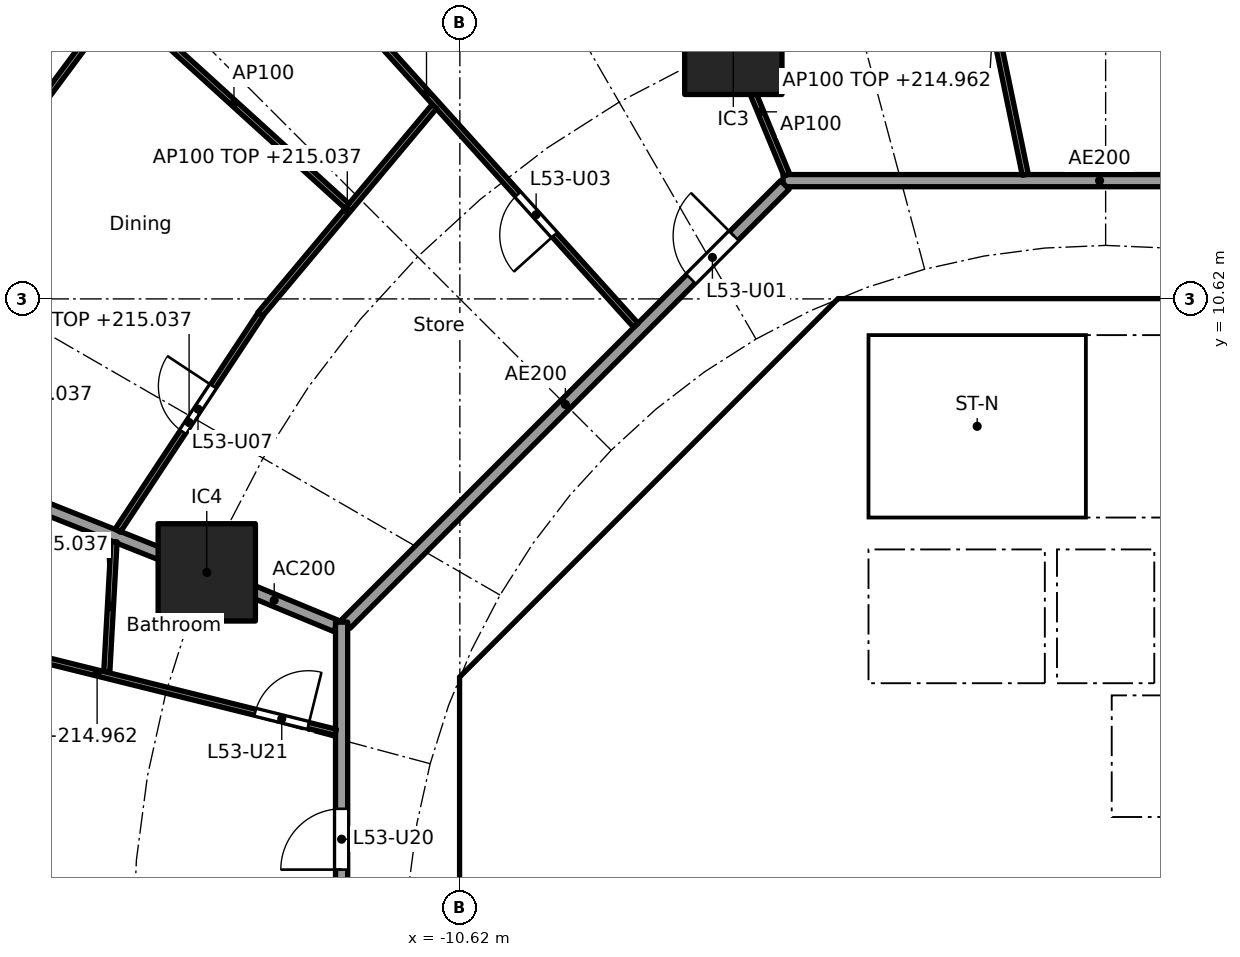
"""IFC4 building model, lengths in metres.
Left out: names, types, materials, properties, quantities, classifications, styles, units other than length and angle.
Written with IfcOpenShell. Run it as: python <this file> out.ifc"""

import sys

from ifc_helpers import new_model, si_unit, direction, frame, frame_2d, origin, origin_2d, place, context, subcontext, project, spatial, polyline, rectangle, outline, extrude, element, fill, save


model = new_model("IFC4")
c1 = context("Model", 3, precision=1e-05, world=origin(), true_north=direction((0.0, 1.0)))
c2 = subcontext(c1, "Body", "Model", "MODEL_VIEW")
j1 = project(units=[si_unit("LENGTHUNIT", "METRE"), si_unit("PLANEANGLEUNIT", "RADIAN")], contexts=[c1])
p1 = place(None, origin())
s1 = spatial("IfcSite", under=j1, at=p1, CompositionType="ELEMENT")
p2 = place(p1, origin())
s2 = spatial("IfcBuilding", under=s1, at=p2, CompositionType="ELEMENT")
p3 = place(p2, frame((0.0, 0.0, 212.2)))
s3 = spatial("IfcBuildingStorey", under=s2, at=p3, CompositionType="ELEMENT", Elevation=212.2)
for number, where, z_axis, x_axis in (
    (1, (-6.123, 14.782, 0.0), (0.0, 0.0, 1.0), (1.0, 0.0, 0.0)),
    (2, (-14.782, 6.123, 0.0), (0.0, 0.0, 1.0), (1.0, 0.0, 0.0)),
):
    element("IfcColumn", number, at=place(p3, frame(where, z_axis=z_axis, x_axis=x_axis)), inside=s3, PredefinedType="COLUMN", context=c2, shape_type="SweptSolid", body=[
        extrude(rectangle(XDim=1.6, YDim=1.6, at=origin_2d()), origin(), (0.0, 0.0, 1.0), 3.7),
    ])
p4 = place(p3, frame((-4.613, 9.988, 0.0), z_axis=(0.0, 0.0, 1.0), x_axis=(-0.707106781187, -0.707106781187, 0.0)))
e3 = element("IfcWall", 3, at=p4, inside=s3, PredefinedType="SHEAR", context=c2, shape_type="SweptSolid", body=[
    extrude(rectangle(XDim=7.602, YDim=0.6, at=frame_2d((3.801, 0.0))), origin(), (0.0, 0.0, 1.0), 3.44),
])
p5 = place(p4, frame((0.351, 0.0, 0.0)))
e4 = element("IfcOpeningElement", 4, at=p5, cuts=e3, PredefinedType="OPENING", context=c2, shape_type="SweptSolid", body=[
    extrude(rectangle(XDim=1.1, YDim=2.1, at=frame_2d((0.55, 1.05))), frame((0.0, 0.31, 0.0), z_axis=(0.0, -1.0, 0.0), x_axis=(1.0, 0.0, 0.0)), (0.0, 0.0, 1.0), 0.62),
])
p6 = place(p3, frame((-10.325, 3.801, 0.0), z_axis=(0.0, 0.0, 1.0), x_axis=(0.0, -1.0, 0.0)))
e5 = element("IfcWall", 5, at=p6, inside=s3, PredefinedType="SHEAR", context=c2, shape_type="SweptSolid", body=[
    extrude(rectangle(XDim=7.602, YDim=0.6, at=frame_2d((3.801, 0.0))), origin(), (0.0, 0.0, 1.0), 3.44),
])
p7 = place(p6, frame((0.651, 0.0, 0.0)))
e6 = element("IfcOpeningElement", 6, at=p7, cuts=e5, PredefinedType="OPENING", context=c2, shape_type="SweptSolid", body=[
    extrude(rectangle(XDim=1.5, YDim=2.1, at=frame_2d((0.75, 1.05))), frame((0.0, 0.31, 0.0), z_axis=(0.0, -1.0, 0.0), x_axis=(1.0, 0.0, 0.0)), (0.0, 0.0, 1.0), 0.62),
])
p8 = place(p6, frame((5.451, 0.0, 0.0)))
e7 = element("IfcOpeningElement", 7, at=p8, cuts=e5, PredefinedType="OPENING", context=c2, shape_type="SweptSolid", body=[
    extrude(rectangle(XDim=1.5, YDim=2.1, at=frame_2d((0.75, 1.05))), frame((0.0, 0.31, 0.0), z_axis=(0.0, -1.0, 0.0), x_axis=(1.0, 0.0, 0.0)), (0.0, 0.0, 1.0), 0.62),
])
p9 = place(p3, frame((-5.8, 4.3, 0.0), z_axis=(0.0, 0.0, 1.0), x_axis=(0.0, 1.0, 0.0)))
e8 = element("IfcWall", 8, at=p9, inside=s3, PredefinedType="PARTITIONING", context=c2, shape_type="SweptSolid", body=[
    extrude(rectangle(XDim=3.927, YDim=0.15, at=frame_2d((1.963, 0.0))), origin(), (0.0, 0.0, 1.0), 3.44),
])
p10 = place(p9, frame((1.551, 0.0, 0.0)))
e9 = element("IfcOpeningElement", 9, at=p10, cuts=e8, PredefinedType="OPENING", context=c2, shape_type="SweptSolid", body=[
    extrude(rectangle(XDim=0.9, YDim=2.1, at=frame_2d((0.45, 1.05))), frame((0.0, 0.085, 0.0), z_axis=(0.0, -1.0, 0.0), x_axis=(1.0, 0.0, 0.0)), (0.0, 0.0, 1.0), 0.17),
])
p11 = place(p3, frame((-4.0, 4.3, 0.0), z_axis=(0.0, 0.0, 1.0), x_axis=(0.0, 1.0, 0.0)))
e10 = element("IfcWall", 10, at=p11, inside=s3, PredefinedType="SOLIDWALL", context=c2, shape_type="SweptSolid", body=[
    extrude(rectangle(XDim=2.2, YDim=0.2, at=frame_2d((1.1, 0.0))), origin(), (0.0, 0.0, 1.0), 3.44),
])
p12 = place(p11, frame((0.55, 0.0, 0.0)))
e11 = element("IfcOpeningElement", 11, at=p12, cuts=e10, PredefinedType="OPENING", context=c2, shape_type="SweptSolid", body=[
    extrude(rectangle(XDim=1.1, YDim=2.1, at=frame_2d((0.55, 1.05))), frame((0.0, 0.11, 0.0), z_axis=(0.0, -1.0, 0.0), x_axis=(1.0, 0.0, 0.0)), (0.0, 0.0, 1.0), 0.22),
])
p13 = place(p3, frame((-6.7, 2.0, 0.0), z_axis=(0.0, 0.0, 1.0), x_axis=(1.0, 0.0, 0.0)))
e12 = element("IfcWall", 12, at=p13, inside=s3, PredefinedType="SOLIDWALL", context=c2, shape_type="SweptSolid", body=[
    extrude(rectangle(XDim=13.4, YDim=0.2, at=frame_2d((6.7, 0.0))), origin(), (0.0, 0.0, 1.0), 3.44),
])
p14 = place(p13, frame((7.25, 0.0, 0.0)))
e13 = element("IfcOpeningElement", 13, at=p14, cuts=e12, PredefinedType="OPENING", context=c2, shape_type="SweptSolid", body=[
    extrude(rectangle(XDim=1.1, YDim=2.1, at=frame_2d((0.55, 1.05))), frame((0.0, 0.11, 0.0), z_axis=(0.0, -1.0, 0.0), x_axis=(1.0, 0.0, 0.0)), (0.0, 0.0, 1.0), 0.22),
])
p15 = place(p13, frame((9.45, 0.0, 0.0)))
e14 = element("IfcOpeningElement", 14, at=p15, cuts=e12, PredefinedType="OPENING", context=c2, shape_type="SweptSolid", body=[
    extrude(rectangle(XDim=1.1, YDim=2.1, at=frame_2d((0.55, 1.05))), frame((0.0, 0.11, 0.0), z_axis=(0.0, -1.0, 0.0), x_axis=(1.0, 0.0, 0.0)), (0.0, 0.0, 1.0), 0.22),
])
p16 = place(p13, frame((0.75, 0.0, 0.0)))
e15 = element("IfcOpeningElement", 15, at=p16, cuts=e12, PredefinedType="OPENING", context=c2, shape_type="SweptSolid", body=[
    extrude(rectangle(XDim=0.9, YDim=2.1, at=frame_2d((0.45, 1.05))), frame((0.0, 0.11, 0.0), z_axis=(0.0, -1.0, 0.0), x_axis=(1.0, 0.0, 0.0)), (0.0, 0.0, 1.0), 0.22),
])
p17 = place(p13, frame((4.05, 0.0, 0.0)))
e16 = element("IfcOpeningElement", 16, at=p17, cuts=e12, PredefinedType="OPENING", context=c2, shape_type="SweptSolid", body=[
    extrude(rectangle(XDim=0.9, YDim=2.1, at=frame_2d((0.45, 1.05))), frame((0.0, 0.11, 0.0), z_axis=(0.0, -1.0, 0.0), x_axis=(1.0, 0.0, 0.0)), (0.0, 0.0, 1.0), 0.22),
])
p18 = place(p3, origin())
e17 = element("IfcWall", 17, at=p18, inside=s3, PredefinedType="SHEAR", context=c2, shape_type="SweptSolid", body=[
    extrude(outline(polyline([(-10.2, 4.825), (-9.776, 4.401), (-10.025, 4.152), (-10.025, 3.801), (-10.625, 3.801), (-10.625, 4.401), (-10.2, 4.825)])), origin(), (0.0, 0.0, 1.0), 3.44),
])
p19 = place(p3, origin())
e18 = element("IfcWall", 18, at=p19, inside=s3, PredefinedType="SHEAR", context=c2, shape_type="SweptSolid", body=[
    extrude(outline(polyline([(-4.152, 10.025), (-4.401, 9.776), (-4.825, 10.2), (-4.401, 10.625), (4.401, 10.625), (4.825, 10.2), (4.401, 9.776), (4.152, 10.025), (-4.152, 10.025)])), origin(), (0.0, 0.0, 1.0), 3.44),
])
for number, where, z_axis, x_axis in (
    (19, (-0.9, 4.3, 0.0), (0.0, 0.0, 1.0), (0.0, 1.0, 0.0)),
    (20, (0.9, 4.3, 0.0), (0.0, 0.0, 1.0), (0.0, 1.0, 0.0)),
):
    element("IfcWall", number, at=place(p3, frame(where, z_axis=z_axis, x_axis=x_axis)), inside=s3, PredefinedType="SOLIDWALL", context=c2, shape_type="SweptSolid", body=[
        extrude(rectangle(XDim=2.2, YDim=0.2, at=frame_2d((1.1, 0.0))), origin(), (0.0, 0.0, 1.0), 3.44),
    ])
p20 = place(p3, origin())
e21 = element("IfcWall", 21, at=p20, inside=s3, PredefinedType="SOLIDWALL", context=c2, shape_type="SweptSolid", body=[
    extrude(outline(polyline([(-6.7, 4.3), (6.7, 4.3), (6.7, 2.1), (6.5, 2.1), (6.5, 4.1), (4.5, 4.1), (4.5, 2.1), (4.3, 2.1), (4.3, 4.1), (2.3, 4.1), (2.3, 2.1), (2.1, 2.1), (2.1, 4.1), (0.1, 4.1), (0.1, 2.1), (-0.1, 2.1), (-0.1, 4.1), (-4.3, 4.1), (-4.3, 2.1), (-4.5, 2.1), (-4.5, 4.1), (-6.5, 4.1), (-6.5, 2.1), (-6.7, 2.1), (-6.7, 4.3)])), origin(), (0.0, 0.0, 1.0), 3.44),
])
p21 = place(p3, frame((-10.025, 4.0, 0.0), z_axis=(0.0, 0.0, 1.0), x_axis=(1.0, 0.0, 0.0)))
e22 = element("IfcWall", 22, at=p21, inside=s3, PredefinedType="PARTITIONING", context=c2, shape_type="SweptSolid", body=[
    extrude(rectangle(XDim=3.325, YDim=0.2, at=frame_2d((1.662, 0.0))), origin(), (0.0, 0.0, 1.0), 3.44),
])
p22 = place(p3, origin())
e23 = element("IfcWall", 23, at=p22, inside=s3, PredefinedType="SOLIDWALL", context=c2, shape_type="SweptSolid", body=[
    extrude(outline(polyline([(-3.9, 7.025), (-4.1, 7.025), (-4.1, 10.025), (-3.9, 10.025), (-3.9, 7.025)])), origin(), (0.0, 0.0, 1.0), 3.44),
])
p23 = place(p3, origin())
e24 = element("IfcWall", 24, at=p23, inside=s3, PredefinedType="SOLIDWALL", context=c2, shape_type="SweptSolid", body=[
    extrude(outline(polyline([(4.1, 6.5), (-4.1, 6.5), (-4.1, 7.025), (4.1, 7.025), (4.1, 6.5)])), origin(), (0.0, 0.0, 1.0), 3.44),
])
p24 = place(p3, frame((-12.657, 5.243, 0.0), z_axis=(0.0, 0.0, 1.0), x_axis=(-0.923859888513, 0.38273085373, 0.0)))
e25 = element("IfcWall", 25, at=p24, inside=s3, PredefinedType="PARTITIONING", context=c2, shape_type="SweptSolid", body=[
    extrude(rectangle(XDim=2.199, YDim=0.2, at=frame_2d((1.1, 0.0))), origin(), (0.0, 0.0, 1.0), 3.44),
])
p25 = place(p3, frame((-14.829, 6.141, 0.0), z_axis=(0.0, 0.0, 1.0), x_axis=(-0.929202069098, 0.36957206981, 0.0)))
e26 = element("IfcWall", 26, at=p25, inside=s3, PredefinedType="PARTITIONING", context=c2, shape_type="SweptSolid", body=[
    extrude(rectangle(XDim=9.957, YDim=0.2, at=frame_2d((4.978, 0.0))), origin(), (0.0, 0.0, 1.0), 2.837),
])
p26 = place(p3, frame((5.104, 12.565, 0.0), z_axis=(0.0, 0.0, 1.0), x_axis=(-1.0, 0.0, 0.0)))
e27 = element("IfcWall", 27, at=p26, inside=s3, PredefinedType="PARTITIONING", context=c2, shape_type="SweptSolid", body=[
    extrude(rectangle(XDim=10.409, YDim=0.2, at=frame_2d((5.205, 0.0))), origin(), (0.0, 0.0, 1.0), 3.44),
])
p27 = place(p3, frame((-5.275, 12.494, 0.0), z_axis=(0.0, 0.0, 1.0), x_axis=(-0.707106781187, -0.707106781187, 0.0)))
e28 = element("IfcWall", 28, at=p27, inside=s3, PredefinedType="PARTITIONING", context=c2, shape_type="SweptSolid", body=[
    extrude(rectangle(XDim=10.209, YDim=0.2, at=frame_2d((5.104, 0.0))), origin(), (0.0, 0.0, 1.0), 3.44),
])
p28 = place(p27, frame((1.185, 0.0, 0.0)))
e29 = element("IfcOpeningElement", 29, at=p28, cuts=e28, PredefinedType="OPENING", context=c2, shape_type="SweptSolid", body=[
    extrude(rectangle(XDim=1.0, YDim=2.1, at=frame_2d((0.5, 1.05))), frame((0.0, 0.11, 0.0), z_axis=(0.0, -1.0, 0.0), x_axis=(1.0, 0.0, 0.0)), (0.0, 0.0, 1.0), 0.22),
])
p29 = place(p3, frame((-12.565, 5.304, 0.0), z_axis=(0.0, 0.0, 1.0), x_axis=(0.0, -1.0, 0.0)))
e30 = element("IfcWall", 30, at=p29, inside=s3, PredefinedType="PARTITIONING", context=c2, shape_type="SweptSolid", body=[
    extrude(rectangle(XDim=10.409, YDim=0.2, at=frame_2d((5.205, 0.0))), origin(), (0.0, 0.0, 1.0), 3.44),
])
p30 = place(p29, frame((3.07, 0.0, 0.0)))
e31 = element("IfcOpeningElement", 31, at=p30, cuts=e30, PredefinedType="OPENING", context=c2, shape_type="SweptSolid", body=[
    extrude(rectangle(XDim=1.0, YDim=2.1, at=frame_2d((0.5, 1.05))), frame((0.0, 0.11, 0.0), z_axis=(0.0, -1.0, 0.0), x_axis=(1.0, 0.0, 0.0)), (0.0, 0.0, 1.0), 0.22),
])
p31 = place(p3, frame((-1.321, 12.663, 0.0), z_axis=(0.0, 0.0, 1.0), x_axis=(-0.202526486639, 0.979276785291, 0.0)))
e32 = element("IfcWall", 32, at=p31, inside=s3, PredefinedType="PARTITIONING", context=c2, shape_type="SweptSolid", body=[
    extrude(rectangle(XDim=5.204, YDim=0.1, at=frame_2d((2.602, 0.0))), origin(), (0.0, 0.0, 1.0), 2.762),
])
p32 = place(p31, frame((2.152, 0.0, 0.0)))
e33 = element("IfcOpeningElement", 33, at=p32, cuts=e32, PredefinedType="OPENING", context=c2, shape_type="SweptSolid", body=[
    extrude(rectangle(XDim=0.9, YDim=2.1, at=frame_2d((0.45, 1.05))), frame((0.0, 0.06, 0.0), z_axis=(0.0, -1.0, 0.0), x_axis=(1.0, 0.0, 0.0)), (0.0, 0.0, 1.0), 0.12),
])
p33 = place(p3, frame((-5.243, 12.657, 0.0), z_axis=(0.0, 0.0, 1.0), x_axis=(-0.382757529444, 0.923848837015, 0.0)))
e34 = element("IfcWall", 34, at=p33, inside=s3, PredefinedType="PARTITIONING", context=c2, shape_type="SweptSolid", body=[
    extrude(rectangle(XDim=2.25, YDim=0.1, at=frame_2d((1.125, 0.0))), origin(), (0.0, 0.0, 1.0), 3.44),
])
p34 = place(p3, frame((-7.725, 10.186, 0.0), z_axis=(0.0, 0.0, 1.0), x_axis=(-0.669819599194, 0.742523874725, 0.0)))
e35 = element("IfcWall", 35, at=p34, inside=s3, PredefinedType="PARTITIONING", context=c2, shape_type="SweptSolid", body=[
    extrude(rectangle(XDim=10.282, YDim=0.1, at=frame_2d((5.141, 0.0))), origin(), (0.0, 0.0, 1.0), 2.762),
])
p35 = place(p34, frame((2.0, 0.0, 0.0)))
e36 = element("IfcOpeningElement", 36, at=p35, cuts=e35, PredefinedType="OPENING", context=c2, shape_type="SweptSolid", body=[
    extrude(rectangle(XDim=0.9, YDim=2.1, at=frame_2d((0.45, 1.05))), frame((0.0, 0.06, 0.0), z_axis=(0.0, -1.0, 0.0), x_axis=(1.0, 0.0, 0.0)), (0.0, 0.0, 1.0), 0.12),
])
p36 = place(p34, frame((7.116, 0.0, 0.0)))
e37 = element("IfcOpeningElement", 37, at=p36, cuts=e35, PredefinedType="OPENING", context=c2, shape_type="SweptSolid", body=[
    extrude(rectangle(XDim=0.9, YDim=2.1, at=frame_2d((0.45, 1.05))), frame((0.0, 0.06, 0.0), z_axis=(0.0, -1.0, 0.0), x_axis=(1.0, 0.0, 0.0)), (0.0, 0.0, 1.0), 0.12),
])
p37 = place(p3, frame((-11.039, 13.785, 0.0), z_axis=(0.0, 0.0, 1.0), x_axis=(-0.642254625966, -0.766491353784, 0.0)))
e38 = element("IfcWall", 38, at=p37, inside=s3, PredefinedType="PARTITIONING", context=c2, shape_type="SweptSolid", body=[
    extrude(rectangle(XDim=4.461, YDim=0.1, at=frame_2d((2.23, 0.0))), origin(), (0.0, 0.0, 1.0), 2.837),
])
p38 = place(p3, frame((-14.608, 17.743, 0.0), z_axis=(0.0, 0.0, 1.0), x_axis=(-0.596174489482, -0.8028548923, 0.0)))
e39 = element("IfcWall", 39, at=p38, inside=s3, PredefinedType="PARTITIONING", context=c2, shape_type="SweptSolid", body=[
    extrude(rectangle(XDim=5.442, YDim=0.1, at=frame_2d((2.721, 0.0))), origin(), (0.0, 0.0, 1.0), 2.837),
])
p39 = place(p3, frame((-12.476, 12.147, 0.0), z_axis=(0.0, 0.0, 1.0), x_axis=(-0.740129203525, 0.672464692077, 0.0)))
e40 = element("IfcWall", 40, at=p39, inside=s3, PredefinedType="PARTITIONING", context=c2, shape_type="SweptSolid", body=[
    extrude(rectangle(XDim=5.022, YDim=0.1, at=frame_2d((2.511, 0.0))), origin(), (0.0, 0.0, 1.0), 3.44),
])
p40 = place(p3, frame((-13.899, 10.363, 0.0), z_axis=(0.0, 0.0, 1.0), x_axis=(-0.551267958114, -0.834328255758, 0.0)))
e41 = element("IfcWall", 41, at=p40, inside=s3, PredefinedType="PARTITIONING", context=c2, shape_type="SweptSolid", body=[
    extrude(rectangle(XDim=4.257, YDim=0.1, at=frame_2d((2.129, 0.0))), origin(), (0.0, 0.0, 1.0), 2.837),
])
p41 = place(p40, frame((1.413, 0.0, 0.0)))
e42 = element("IfcOpeningElement", 42, at=p41, cuts=e41, PredefinedType="OPENING", context=c2, shape_type="SweptSolid", body=[
    extrude(rectangle(XDim=0.9, YDim=2.1, at=frame_2d((0.45, 1.05))), frame((0.0, 0.06, 0.0), z_axis=(0.0, -1.0, 0.0), x_axis=(1.0, 0.0, 0.0)), (0.0, 0.0, 1.0), 0.12),
])
p42 = place(p3, frame((-16.307, 6.627, 0.0), z_axis=(0.0, 0.0, 1.0), x_axis=(-0.055608865939, -0.998452629837, 0.0)))
e43 = element("IfcWall", 43, at=p42, inside=s3, PredefinedType="PARTITIONING", context=c2, shape_type="SweptSolid", body=[
    extrude(rectangle(XDim=2.143, YDim=0.1, at=frame_2d((1.071, 0.0))), origin(), (0.0, 0.0, 1.0), 2.837),
])
p43 = place(p3, frame((-12.662, 3.494, 0.0), z_axis=(0.0, 0.0, 1.0), x_axis=(-0.970505526029, 0.241078874951, 0.0)))
e44 = element("IfcWall", 44, at=p43, inside=s3, PredefinedType="PARTITIONING", context=c2, shape_type="SweptSolid", body=[
    extrude(rectangle(XDim=8.085, YDim=0.1, at=frame_2d((4.043, 0.0))), origin(), (0.0, 0.0, 1.0), 2.762),
])
p44 = place(p43, frame((0.464, 0.0, 0.0)))
e45 = element("IfcOpeningElement", 45, at=p44, cuts=e44, PredefinedType="OPENING", context=c2, shape_type="SweptSolid", body=[
    extrude(rectangle(XDim=0.9, YDim=2.1, at=frame_2d((0.45, 1.05))), frame((0.0, 0.06, 0.0), z_axis=(0.0, -1.0, 0.0), x_axis=(1.0, 0.0, 0.0)), (0.0, 0.0, 1.0), 0.12),
])
p45 = place(p43, frame((5.535, 0.0, 0.0)))
e46 = element("IfcOpeningElement", 46, at=p45, cuts=e44, PredefinedType="OPENING", context=c2, shape_type="SweptSolid", body=[
    extrude(rectangle(XDim=0.9, YDim=2.1, at=frame_2d((0.45, 1.05))), frame((0.0, 0.06, 0.0), z_axis=(0.0, -1.0, 0.0), x_axis=(1.0, 0.0, 0.0)), (0.0, 0.0, 1.0), 0.12),
])
p46 = place(p14, origin())
e47 = element("IfcDoor", 47, at=p46, inside=s3, OperationType="DOUBLE_DOOR_SLIDING", PredefinedType="DOOR", context=c2, shape_type="SweptSolid", body=[
    extrude(rectangle(XDim=1.1, YDim=2.1, at=frame_2d((0.55, 1.05))), frame((0.0, 0.025, 0.0), z_axis=(0.0, -1.0, 0.0), x_axis=(1.0, 0.0, 0.0)), (0.0, 0.0, 1.0), 0.05),
])
fill(e13, e47)
p47 = place(p12, origin())
e48 = element("IfcDoor", 48, at=p47, inside=s3, OperationType="DOUBLE_DOOR_SLIDING", PredefinedType="DOOR", context=c2, shape_type="SweptSolid", body=[
    extrude(rectangle(XDim=1.1, YDim=2.1, at=frame_2d((0.55, 1.05))), frame((0.0, 0.025, 0.0), z_axis=(0.0, -1.0, 0.0), x_axis=(1.0, 0.0, 0.0)), (0.0, 0.0, 1.0), 0.05),
])
fill(e11, e48)
p48 = place(p10, origin())
e49 = element("IfcDoor", 49, at=p48, inside=s3, OperationType="SINGLE_SWING_LEFT", PredefinedType="DOOR", context=c2, shape_type="SweptSolid", body=[
    extrude(rectangle(XDim=0.9, YDim=2.1, at=frame_2d((0.45, 1.05))), frame((0.0, 0.025, 0.0), z_axis=(0.0, -1.0, 0.0), x_axis=(1.0, 0.0, 0.0)), (0.0, 0.0, 1.0), 0.05),
])
fill(e9, e49)
p49 = place(p16, origin())
e50 = element("IfcDoor", 50, at=p49, inside=s3, OperationType="SINGLE_SWING_RIGHT", PredefinedType="DOOR", context=c2, shape_type="SweptSolid", body=[
    extrude(rectangle(XDim=0.9, YDim=2.1, at=frame_2d((0.45, 1.05))), frame((0.0, 0.025, 0.0), z_axis=(0.0, -1.0, 0.0), x_axis=(1.0, 0.0, 0.0)), (0.0, 0.0, 1.0), 0.05),
])
fill(e15, e50)
p50 = place(p17, origin())
e51 = element("IfcDoor", 51, at=p50, inside=s3, OperationType="SINGLE_SWING_RIGHT", PredefinedType="DOOR", context=c2, shape_type="SweptSolid", body=[
    extrude(rectangle(XDim=0.9, YDim=2.1, at=frame_2d((0.45, 1.05))), frame((0.0, 0.025, 0.0), z_axis=(0.0, -1.0, 0.0), x_axis=(1.0, 0.0, 0.0)), (0.0, 0.0, 1.0), 0.05),
])
fill(e16, e51)
p51 = place(p7, origin())
e52 = element("IfcDoor", 52, at=p51, inside=s3, OperationType="DOUBLE_DOOR_SINGLE_SWING", PredefinedType="DOOR", context=c2, shape_type="SweptSolid", body=[
    extrude(rectangle(XDim=1.5, YDim=2.1, at=frame_2d((0.75, 1.05))), frame((0.0, 0.025, 0.0), z_axis=(0.0, -1.0, 0.0), x_axis=(1.0, 0.0, 0.0)), (0.0, 0.0, 1.0), 0.05),
])
fill(e6, e52)
p52 = place(p5, origin())
e53 = element("IfcDoor", 53, at=p52, inside=s3, OperationType="SINGLE_SWING_LEFT", PredefinedType="DOOR", context=c2, shape_type="SweptSolid", body=[
    extrude(rectangle(XDim=1.1, YDim=2.1, at=frame_2d((0.55, 1.05))), frame((0.0, 0.025, 0.0), z_axis=(0.0, -1.0, 0.0), x_axis=(1.0, 0.0, 0.0)), (0.0, 0.0, 1.0), 0.05),
])
fill(e4, e53)
p53 = place(p28, frame((1.0, 0.0, 0.0), x_axis=(-1.0, 0.0, 0.0)))
e54 = element("IfcDoor", 54, at=p53, inside=s3, OperationType="SINGLE_SWING_RIGHT", PredefinedType="DOOR", context=c2, shape_type="SweptSolid", body=[
    extrude(rectangle(XDim=1.0, YDim=2.1, at=frame_2d((0.5, 1.05))), frame((0.0, 0.025, 0.0), z_axis=(0.0, -1.0, 0.0), x_axis=(1.0, 0.0, 0.0)), (0.0, 0.0, 1.0), 0.05),
])
fill(e29, e54)
p54 = place(p35, origin())
e55 = element("IfcDoor", 55, at=p54, inside=s3, OperationType="SINGLE_SWING_LEFT", PredefinedType="DOOR", context=c2, shape_type="SweptSolid", body=[
    extrude(rectangle(XDim=0.9, YDim=2.1, at=frame_2d((0.45, 1.05))), frame((0.0, 0.025, 0.0), z_axis=(0.0, -1.0, 0.0), x_axis=(1.0, 0.0, 0.0)), (0.0, 0.0, 1.0), 0.05),
])
fill(e36, e55)
p55 = place(p41, frame((0.9, 0.0, 0.0), x_axis=(-1.0, 0.0, 0.0)))
e56 = element("IfcDoor", 56, at=p55, inside=s3, OperationType="SINGLE_SWING_RIGHT", PredefinedType="DOOR", context=c2, shape_type="SweptSolid", body=[
    extrude(rectangle(XDim=0.9, YDim=2.1, at=frame_2d((0.45, 1.05))), frame((0.0, 0.025, 0.0), z_axis=(0.0, -1.0, 0.0), x_axis=(1.0, 0.0, 0.0)), (0.0, 0.0, 1.0), 0.05),
])
fill(e42, e56)
p56 = place(p30, frame((1.0, 0.0, 0.0), x_axis=(-1.0, 0.0, 0.0)))
e57 = element("IfcDoor", 57, at=p56, inside=s3, OperationType="SINGLE_SWING_LEFT", PredefinedType="DOOR", context=c2, shape_type="SweptSolid", body=[
    extrude(rectangle(XDim=1.0, YDim=2.1, at=frame_2d((0.5, 1.05))), frame((0.0, 0.025, 0.0), z_axis=(0.0, -1.0, 0.0), x_axis=(1.0, 0.0, 0.0)), (0.0, 0.0, 1.0), 0.05),
])
fill(e31, e57)
p57 = place(p44, frame((0.9, 0.0, 0.0), x_axis=(-1.0, 0.0, 0.0)))
e58 = element("IfcDoor", 58, at=p57, inside=s3, OperationType="SINGLE_SWING_RIGHT", PredefinedType="DOOR", context=c2, shape_type="SweptSolid", body=[
    extrude(rectangle(XDim=0.9, YDim=2.1, at=frame_2d((0.45, 1.05))), frame((0.0, 0.025, 0.0), z_axis=(0.0, -1.0, 0.0), x_axis=(1.0, 0.0, 0.0)), (0.0, 0.0, 1.0), 0.05),
])
fill(e45, e58)
save(model, sys.argv[1])
